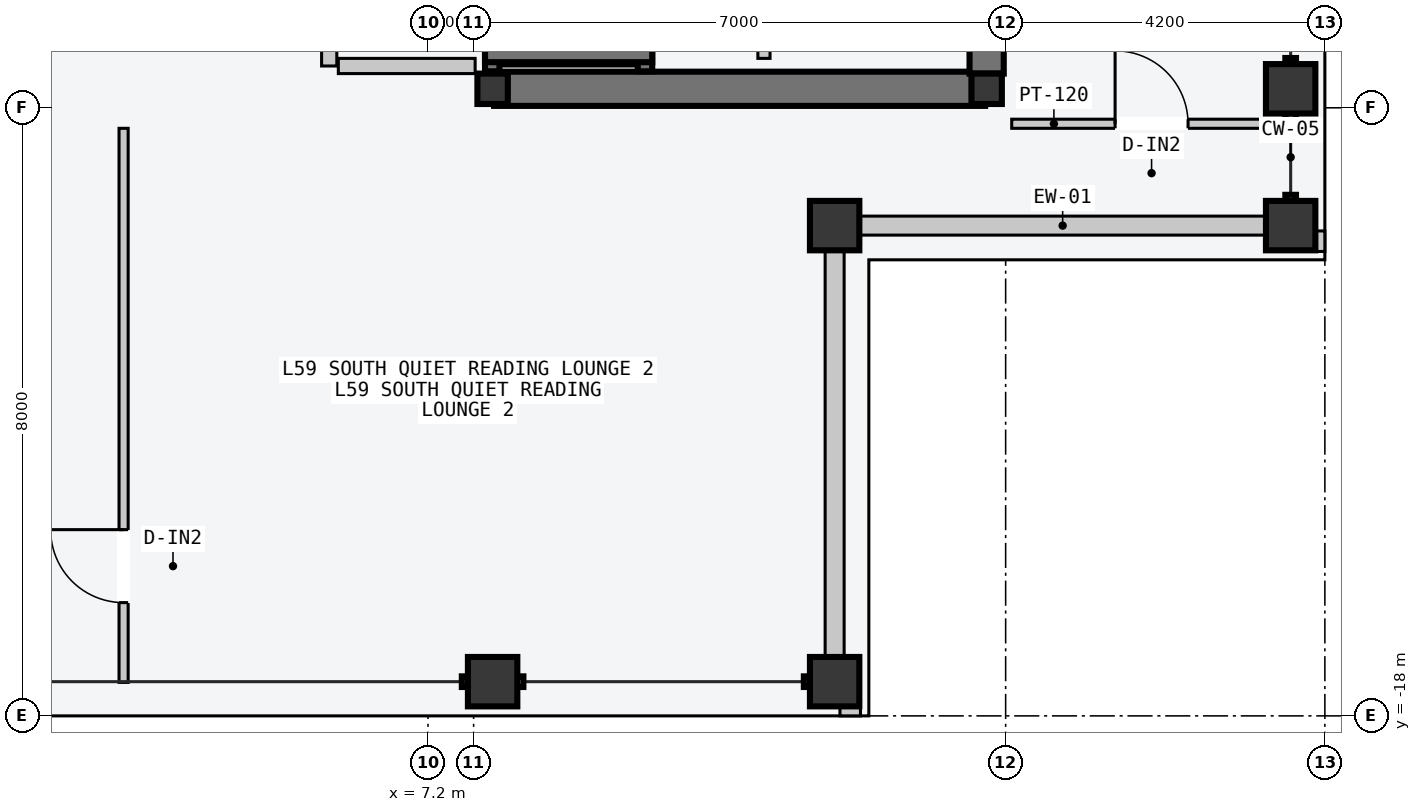
"""IFC4 building model, lengths in metres.
Left out: names, types, materials, properties, quantities, classifications, styles, units other than length and angle.
Written with IfcOpenShell. Run it as: python <this file> out.ifc"""

import sys

from ifc_helpers import new_model, si_unit, direction, frame, frame_2d, origin, origin_2d, place, context, subcontext, project, spatial, rectangle, hollow_rectangle, i_section, extrude, element, fill, save


model = new_model("IFC4")
c1 = context("Model", 3, precision=1e-05, world=origin(), true_north=direction((0.0, 1.0)))
c2 = subcontext(c1, "Body", "Model", "MODEL_VIEW")
j1 = project(units=[si_unit("LENGTHUNIT", "METRE"), si_unit("PLANEANGLEUNIT", "RADIAN")], contexts=[c1])
p1 = place(None, origin())
s1 = spatial("IfcSite", under=j1, at=p1, CompositionType="ELEMENT")
p2 = place(p1, origin())
s2 = spatial("IfcBuilding", under=s1, at=p2, CompositionType="ELEMENT")
p3 = place(p2, frame((0.0, 0.0, 225.6)))
s3 = spatial("IfcBuildingStorey", under=s2, at=p3, CompositionType="ELEMENT", Elevation=225.6)
p4 = place(p3, frame((8.07, -9.75, -0.2), z_axis=(0.0, 0.0, 1.0), x_axis=(1.0, 0.0, 0.0)))
e1 = element("IfcWall", 1, at=p4, inside=s3, PredefinedType="SHEAR", context=c2, shape_type="SweptSolid", body=[
    extrude(rectangle(XDim=6.46, YDim=0.45, at=frame_2d((3.23, 0.0))), origin(), (0.0, 0.0, 1.0), 3.6),
])
p5 = place(p3, frame((14.55, -9.55, -0.2), z_axis=(0.0, 0.0, 1.0), x_axis=(0.0, 1.0, 0.0)))
e2 = element("IfcWall", 2, at=p5, inside=s3, PredefinedType="SHEAR", context=c2, shape_type="SweptSolid", body=[
    extrude(rectangle(XDim=9.35, YDim=0.45, at=frame_2d((4.675, 0.0))), origin(), (0.0, 0.0, 1.0), 3.6),
])
for number, where, z_axis, x_axis in (
    (3, (8.05, -9.75, 0.0), (0.0, 0.0, 1.0), (1.0, 0.0, 0.0)),
    (4, (14.55, -9.75, 0.0), (0.0, 0.0, 1.0), (1.0, 0.0, 0.0)),
):
    element("IfcColumn", number, at=place(p3, frame(where, z_axis=z_axis, x_axis=x_axis)), inside=s3, PredefinedType="COLUMN", context=c2, shape_type="SweptSolid", body=[
        extrude(i_section(OverallWidth=0.4, OverallDepth=0.4, WebThickness=0.013, FlangeThickness=0.021, at=origin_2d()), origin(), (0.0, 0.0, 1.0), 3.6),
    ])
for number, where, z_axis, x_axis in (
    (5, (8.05, -17.55, 0.0), (0.0, 0.0, 1.0), (1.0, 0.0, 0.0)),
    (6, (12.55, -17.55, 0.0), (0.0, 0.0, 1.0), (1.0, 0.0, 0.0)),
    (7, (18.55, -11.55, 0.0), (0.0, 0.0, 1.0), (0.0, 1.0, 0.0)),
    (8, (18.55, -9.75, 0.0), (0.0, 0.0, 1.0), (0.0, 1.0, 0.0)),
    (9, (12.55, -11.55, 0.0), (0.0, 0.0, 1.0), (1.0, 0.0, 0.0)),
):
    element("IfcColumn", number, at=place(p3, frame(where, z_axis=z_axis, x_axis=x_axis)), inside=s3, PredefinedType="COLUMN", context=c2, shape_type="SweptSolid", body=[
        extrude(hollow_rectangle(XDim=0.65, YDim=0.65, WallThickness=0.028, at=origin_2d()), origin(), (0.0, 0.0, 1.0), 3.6),
    ])
for number, where, z_axis, x_axis in (
    (10, (12.885, -11.55, 0.0), (0.0, 0.0, 1.0), (1.0, 0.0, 0.0)),
    (11, (12.55, -17.215, 0.0), (0.0, 0.0, 1.0), (0.0, 1.0, 0.0)),
):
    element("IfcWall", number, at=place(p3, frame(where, z_axis=z_axis, x_axis=x_axis)), inside=s3, PredefinedType="STANDARD", context=c2, shape_type="SweptSolid", body=[
        extrude(rectangle(XDim=5.33, YDim=0.25, at=frame_2d((2.665, 0.0))), origin(), (0.0, 0.0, 1.0), 2.85),
    ])
for number, where, z_axis, x_axis in (
    (12, (12.62, -17.89, 0.0), (0.0, 0.0, 1.0), (1.0, 0.0, 0.0)),
    (13, (18.89, -11.89, 0.0), (0.0, 0.0, 1.0), (0.0, 1.0, 0.0)),
):
    element("IfcWall", number, at=place(p3, frame(where, z_axis=z_axis, x_axis=x_axis)), inside=s3, PredefinedType="PARAPET", context=c2, shape_type="SweptSolid", body=[
        extrude(rectangle(XDim=0.27, YDim=0.22, at=frame_2d((0.135, 0.0))), origin(), (0.0, 0.0, 1.0), 1.2),
    ])
p6 = place(p3, frame((8.045, -9.52, -0.2), z_axis=(0.0, 0.0, 1.0), x_axis=(0.0, 1.0, 0.0)))
e14 = element("IfcWall", 14, at=p6, inside=s3, PredefinedType="SOLIDWALL", context=c2, shape_type="SweptSolid", body=[
    extrude(rectangle(XDim=2.12, YDim=0.19, at=frame_2d((1.06, 0.0))), origin(), (0.0, 0.0, 1.0), 3.6),
])
p7 = place(p6, frame((0.57, 0.0, 0.2)))
e15 = element("IfcOpeningElement", 15, at=p7, cuts=e14, PredefinedType="OPENING", context=c2, shape_type="SweptSolid", body=[
    extrude(rectangle(XDim=1.1, YDim=2.2, at=frame_2d((0.55, 1.1))), frame((0.0, 0.105, 0.0), z_axis=(0.0, -1.0, 0.0), x_axis=(1.0, 0.0, 0.0)), (0.0, 0.0, 1.0), 0.21),
])
p8 = place(p3, frame((10.055, -9.52, -0.2), z_axis=(0.0, 0.0, 1.0), x_axis=(0.0, 1.0, 0.0)))
e16 = element("IfcWall", 16, at=p8, inside=s3, PredefinedType="SOLIDWALL", context=c2, shape_type="SweptSolid", body=[
    extrude(rectangle(XDim=2.12, YDim=0.19, at=frame_2d((1.06, 0.0))), origin(), (0.0, 0.0, 1.0), 3.6),
])
p9 = place(p3, frame((7.95, -9.305, -0.2), z_axis=(0.0, 0.0, 1.0), x_axis=(1.0, 0.0, 0.0)))
e17 = element("IfcWall", 17, at=p9, inside=s3, PredefinedType="SOLIDWALL", context=c2, shape_type="SweptSolid", body=[
    extrude(rectangle(XDim=2.2, YDim=0.19, at=frame_2d((1.1, 0.0))), origin(), (0.0, 0.0, 1.0), 3.6),
])
p10 = place(p3, frame((5.9, -9.45, 0.0), z_axis=(0.0, 0.0, 1.0), x_axis=(0.0, 1.0, 0.0)))
e18 = element("IfcWall", 18, at=p10, inside=s3, PredefinedType="PARTITIONING", context=c2, shape_type="SweptSolid", body=[
    extrude(rectangle(XDim=10.5, YDim=0.2, at=frame_2d((5.25, 0.0))), origin(), (0.0, 0.0, 1.0), 3.4),
])
p11 = place(p10, frame((3.9, 0.0, 0.0)))
e19 = element("IfcOpeningElement", 19, at=p11, cuts=e18, PredefinedType="OPENING", context=c2, shape_type="SweptSolid", body=[
    extrude(rectangle(XDim=1.5, YDim=2.2, at=frame_2d((0.75, 1.1))), frame((0.0, 0.11, 0.0), z_axis=(0.0, -1.0, 0.0), x_axis=(1.0, 0.0, 0.0)), (0.0, 0.0, 1.0), 0.22),
])
p12 = place(p3, frame((6.02, -9.45, 0.0), z_axis=(0.0, 0.0, 1.0), x_axis=(1.0, 0.0, 0.0)))
e20 = element("IfcWall", 20, at=p12, inside=s3, PredefinedType="PARTITIONING", context=c2, shape_type="SweptSolid", body=[
    extrude(rectangle(XDim=1.8, YDim=0.2, at=frame_2d((0.9, 0.0))), origin(), (0.0, 0.0, 1.0), 3.4),
])
p13 = place(p3, frame((11.62, -9.35, 0.0), z_axis=(0.0, 0.0, 1.0), x_axis=(0.0, 1.0, 0.0)))
e21 = element("IfcWall", 21, at=p13, inside=s3, PredefinedType="PARTITIONING", context=c2, shape_type="SweptSolid", body=[
    extrude(rectangle(XDim=3.85, YDim=0.16, at=frame_2d((1.925, 0.0))), origin(), (0.0, 0.0, 1.0), 3.4),
])
p14 = place(p13, frame((0.512, 0.0, 0.0)))
e22 = element("IfcOpeningElement", 22, at=p14, cuts=e21, PredefinedType="OPENING", context=c2, shape_type="SweptSolid", body=[
    extrude(rectangle(XDim=0.9, YDim=2.15, at=frame_2d((0.45, 1.075))), frame((0.0, 0.09, 0.0), z_axis=(0.0, -1.0, 0.0), x_axis=(1.0, 0.0, 0.0)), (0.0, 0.0, 1.0), 0.18),
])
p15 = place(p13, frame((2.438, 0.0, 0.0)))
e23 = element("IfcOpeningElement", 23, at=p15, cuts=e21, PredefinedType="OPENING", context=c2, shape_type="SweptSolid", body=[
    extrude(rectangle(XDim=0.9, YDim=2.15, at=frame_2d((0.45, 1.075))), frame((0.0, 0.09, 0.0), z_axis=(0.0, -1.0, 0.0), x_axis=(1.0, 0.0, 0.0)), (0.0, 0.0, 1.0), 0.18),
])
p16 = place(p3, frame((3.195, -17.56, 0.0), z_axis=(0.0, 0.0, 1.0), x_axis=(0.0, 1.0, 0.0)))
e24 = element("IfcWall", 24, at=p16, inside=s3, PredefinedType="PARTITIONING", context=c2, shape_type="SweptSolid", body=[
    extrude(rectangle(XDim=7.29, YDim=0.12, at=frame_2d((3.645, 0.0))), origin(), (0.0, 0.0, 1.0), 3.4),
])
p17 = place(p16, frame((1.05, 0.0, 0.0)))
e25 = element("IfcOpeningElement", 25, at=p17, cuts=e24, PredefinedType="OPENING", context=c2, shape_type="SweptSolid", body=[
    extrude(rectangle(XDim=0.96, YDim=2.18, at=frame_2d((0.48, 1.09))), frame((0.0, 0.07, 0.0), z_axis=(0.0, -1.0, 0.0), x_axis=(1.0, 0.0, 0.0)), (0.0, 0.0, 1.0), 0.14),
])
p18 = place(p3, frame((14.88, -10.21, 0.0), z_axis=(0.0, 0.0, 1.0), x_axis=(1.0, 0.0, 0.0)))
e26 = element("IfcWall", 26, at=p18, inside=s3, PredefinedType="PARTITIONING", context=c2, shape_type="SweptSolid", body=[
    extrude(rectangle(XDim=3.68, YDim=0.12, at=frame_2d((1.84, 0.0))), origin(), (0.0, 0.0, 1.0), 3.4),
])
p19 = place(p18, frame((1.36, 0.0, 0.0)))
e27 = element("IfcOpeningElement", 27, at=p19, cuts=e26, PredefinedType="OPENING", context=c2, shape_type="SweptSolid", body=[
    extrude(rectangle(XDim=0.96, YDim=2.18, at=frame_2d((0.48, 1.09))), frame((0.0, 0.07, 0.0), z_axis=(0.0, -1.0, 0.0), x_axis=(1.0, 0.0, 0.0)), (0.0, 0.0, 1.0), 0.14),
])
p20 = place(p17, origin())
e28 = element("IfcDoor", 28, at=p20, inside=s3, OperationType="SINGLE_SWING_RIGHT", PredefinedType="DOOR", context=c2, shape_type="SweptSolid", body=[
    extrude(rectangle(XDim=0.96, YDim=2.18, at=frame_2d((0.48, 1.09))), frame((0.0, 0.025, 0.0), z_axis=(0.0, -1.0, 0.0), x_axis=(1.0, 0.0, 0.0)), (0.0, 0.0, 1.0), 0.05),
])
fill(e25, e28)
p21 = place(p19, origin())
e29 = element("IfcDoor", 29, at=p21, inside=s3, OperationType="SINGLE_SWING_LEFT", PredefinedType="DOOR", context=c2, shape_type="SweptSolid", body=[
    extrude(rectangle(XDim=0.96, YDim=2.18, at=frame_2d((0.48, 1.09))), frame((0.0, 0.025, 0.0), z_axis=(0.0, -1.0, 0.0), x_axis=(1.0, 0.0, 0.0)), (0.0, 0.0, 1.0), 0.05),
])
fill(e27, e29)
save(model, sys.argv[1])
